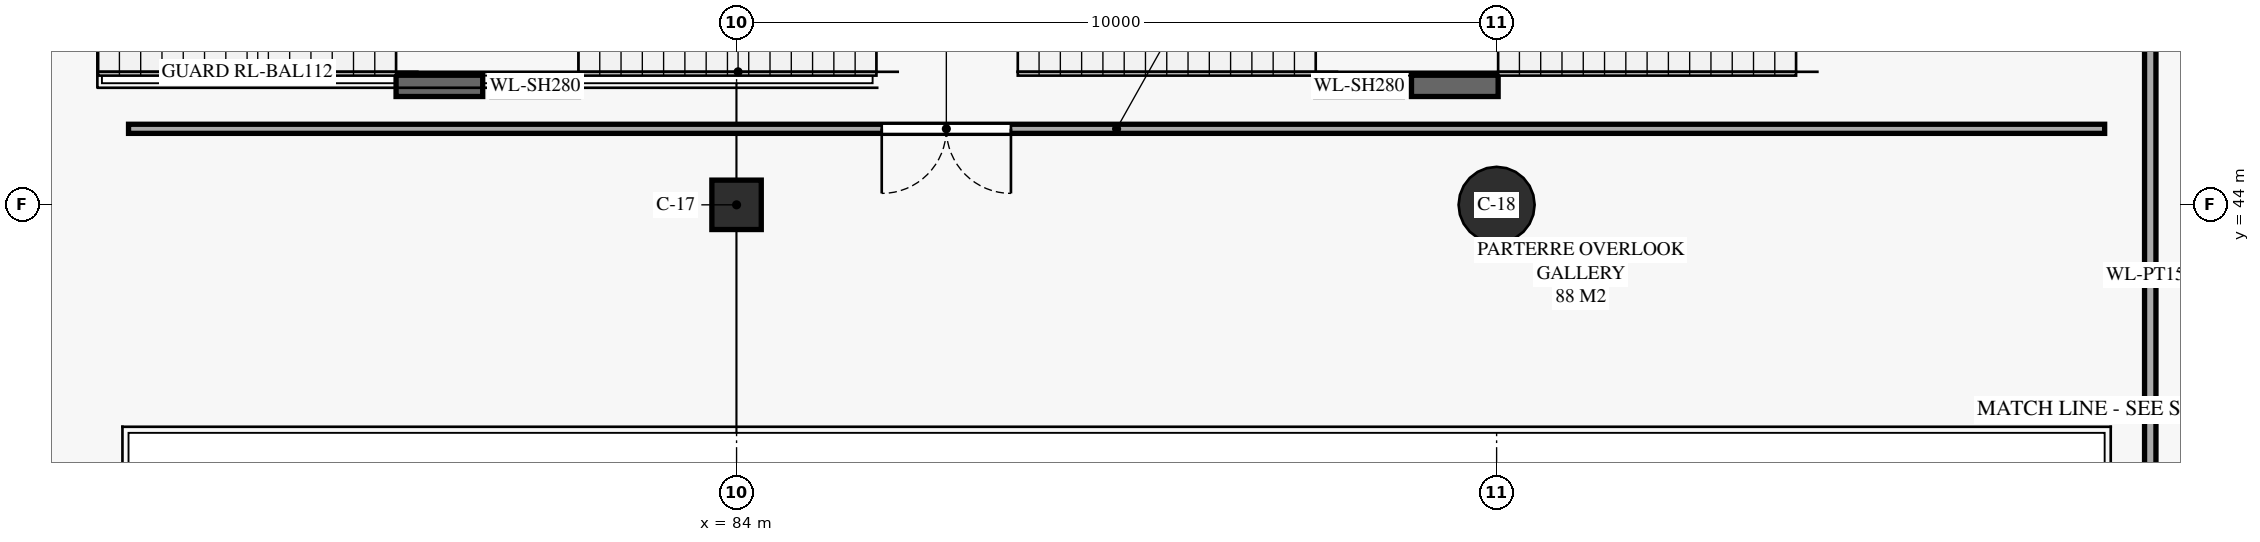
"""IFC4 building model, lengths in metres.
Left out: names, types, materials, properties, quantities, classifications, styles, units other than length and angle.
Written with IfcOpenShell. Run it as: python <this file> out.ifc"""

import sys

from ifc_helpers import new_model, si_unit, direction, frame, frame_2d, origin, origin_2d, place, context, subcontext, project, spatial, rectangle, circle, extrude, element, fill, save


model = new_model("IFC4")
c1 = context("Model", 3, precision=1e-05, world=origin(), true_north=direction((0.0, 1.0)))
c2 = subcontext(c1, "Body", "Model", "MODEL_VIEW")
j1 = project(units=[si_unit("LENGTHUNIT", "METRE"), si_unit("PLANEANGLEUNIT", "RADIAN")], contexts=[c1])
p1 = place(None, origin())
s1 = spatial("IfcSite", under=j1, at=p1, CompositionType="ELEMENT")
p2 = place(p1, origin())
s2 = spatial("IfcBuilding", under=s1, at=p2, CompositionType="ELEMENT")
p3 = place(p2, frame((0.0, 0.0, 5.0)))
s3 = spatial("IfcBuildingStorey", under=s2, at=p3, CompositionType="ELEMENT", Elevation=5.0)
p4 = place(p3, frame((84.0, 44.0, 0.0), z_axis=(0.0, 0.0, 1.0), x_axis=(1.0, 0.0, 0.0)))
e1 = element("IfcColumn", 1, at=p4, inside=s3, PredefinedType="COLUMN", context=c2, shape_type="SweptSolid", body=[
    extrude(rectangle(XDim=0.65, YDim=0.65, at=origin_2d()), origin(), (0.0, 0.0, 1.0), 5.0),
])
p5 = place(p3, frame((94.0, 44.0, 0.0), z_axis=(0.0, 0.0, 1.0), x_axis=(1.0, 0.0, 0.0)))
e2 = element("IfcColumn", 2, at=p5, inside=s3, PredefinedType="COLUMN", context=c2, shape_type="SweptSolid", body=[
    extrude(circle(Radius=0.5, at=origin_2d()), origin(), (0.0, 0.0, 1.0), 5.0),
])
for number, where, z_axis, x_axis in (
    (3, (79.52, 45.565, 0.0), (0.0, 0.0, 1.0), (1.0, 0.0, 0.0)),
    (4, (80.78, 45.565, 0.0), (0.0, 0.0, 1.0), (1.0, 0.0, 0.0)),
):
    element("IfcWall", number, at=place(p3, frame(where, z_axis=z_axis, x_axis=x_axis)), inside=s3, PredefinedType="SHEAR", context=c2, shape_type="SweptSolid", body=[
        extrude(rectangle(XDim=1.14, YDim=0.28, at=frame_2d((0.57, 0.0))), origin(), (0.0, 0.0, 1.0), 4.7),
    ])
p6 = place(p3, frame((91.62, 45.565, 0.0), z_axis=(0.0, 0.0, 1.0), x_axis=(1.0, 0.0, 0.0)))
e5 = element("IfcWall", 5, at=p6, inside=s3, PredefinedType="SHEAR", context=c2, shape_type="SweptSolid", body=[
    extrude(rectangle(XDim=1.14, YDim=0.28, at=frame_2d((0.57, 0.0))), origin(), (0.0, 0.0, 1.0), 2.3),
])
p7 = place(p3, frame((92.88, 45.565, 0.0), z_axis=(0.0, 0.0, 1.0), x_axis=(1.0, 0.0, 0.0)))
e6 = element("IfcWall", 6, at=p7, inside=s3, PredefinedType="SHEAR", context=c2, shape_type="SweptSolid", body=[
    extrude(rectangle(XDim=1.14, YDim=0.28, at=frame_2d((0.57, 0.0))), origin(), (0.0, 0.0, 1.0), 2.3),
])
p8 = place(p3, frame((102.6, 48.65, 0.0), z_axis=(0.0, 0.0, 1.0), x_axis=(0.0, -1.0, 0.0)))
e7 = element("IfcWall", 7, at=p8, inside=s3, PredefinedType="PARTITIONING", context=c2, shape_type="SweptSolid", body=[
    extrude(rectangle(XDim=21.7, YDim=0.15, at=frame_2d((10.85, 0.0))), origin(), (0.0, 0.0, 1.0), 4.68),
])
p9 = place(p8, frame((9.975, 0.0, 0.0)))
e8 = element("IfcOpeningElement", 8, at=p9, cuts=e7, PredefinedType="OPENING", context=c2, shape_type="SweptSolid", body=[
    extrude(rectangle(XDim=1.75, YDim=2.2, at=frame_2d((0.875, 1.1))), frame((0.0, 0.085, 0.0), z_axis=(0.0, -1.0, 0.0), x_axis=(1.0, 0.0, 0.0)), (0.0, 0.0, 1.0), 0.17),
])
p10 = place(p3, frame((102.0, 45.0, 0.0), z_axis=(0.0, 0.0, 1.0), x_axis=(-1.0, 0.0, 0.0)))
e9 = element("IfcWall", 9, at=p10, inside=s3, PredefinedType="PARTITIONING", context=c2, shape_type="SweptSolid", body=[
    extrude(rectangle(XDim=26.0, YDim=0.12, at=frame_2d((13.0, 0.0))), origin(), (0.0, 0.0, 1.0), 4.68),
])
p11 = place(p10, frame((14.39, 0.0, 0.0)))
e10 = element("IfcOpeningElement", 10, at=p11, cuts=e9, PredefinedType="OPENING", context=c2, shape_type="SweptSolid", body=[
    extrude(rectangle(XDim=1.7, YDim=2.2, at=frame_2d((0.85, 1.1))), frame((0.0, 0.07, 0.0), z_axis=(0.0, -1.0, 0.0), x_axis=(1.0, 0.0, 0.0)), (0.0, 0.0, 1.0), 0.14),
])
p12 = place(p11, origin())
e11 = element("IfcDoor", 11, at=p12, inside=s3, OperationType="DOUBLE_DOOR_SINGLE_SWING", PredefinedType="DOOR", context=c2, shape_type="SweptSolid", body=[
    extrude(rectangle(XDim=1.7, YDim=2.2, at=frame_2d((0.85, 1.1))), frame((0.0, 0.025, 0.0), z_axis=(0.0, -1.0, 0.0), x_axis=(1.0, 0.0, 0.0)), (0.0, 0.0, 1.0), 0.05),
])
fill(e10, e11)
save(model, sys.argv[1])
